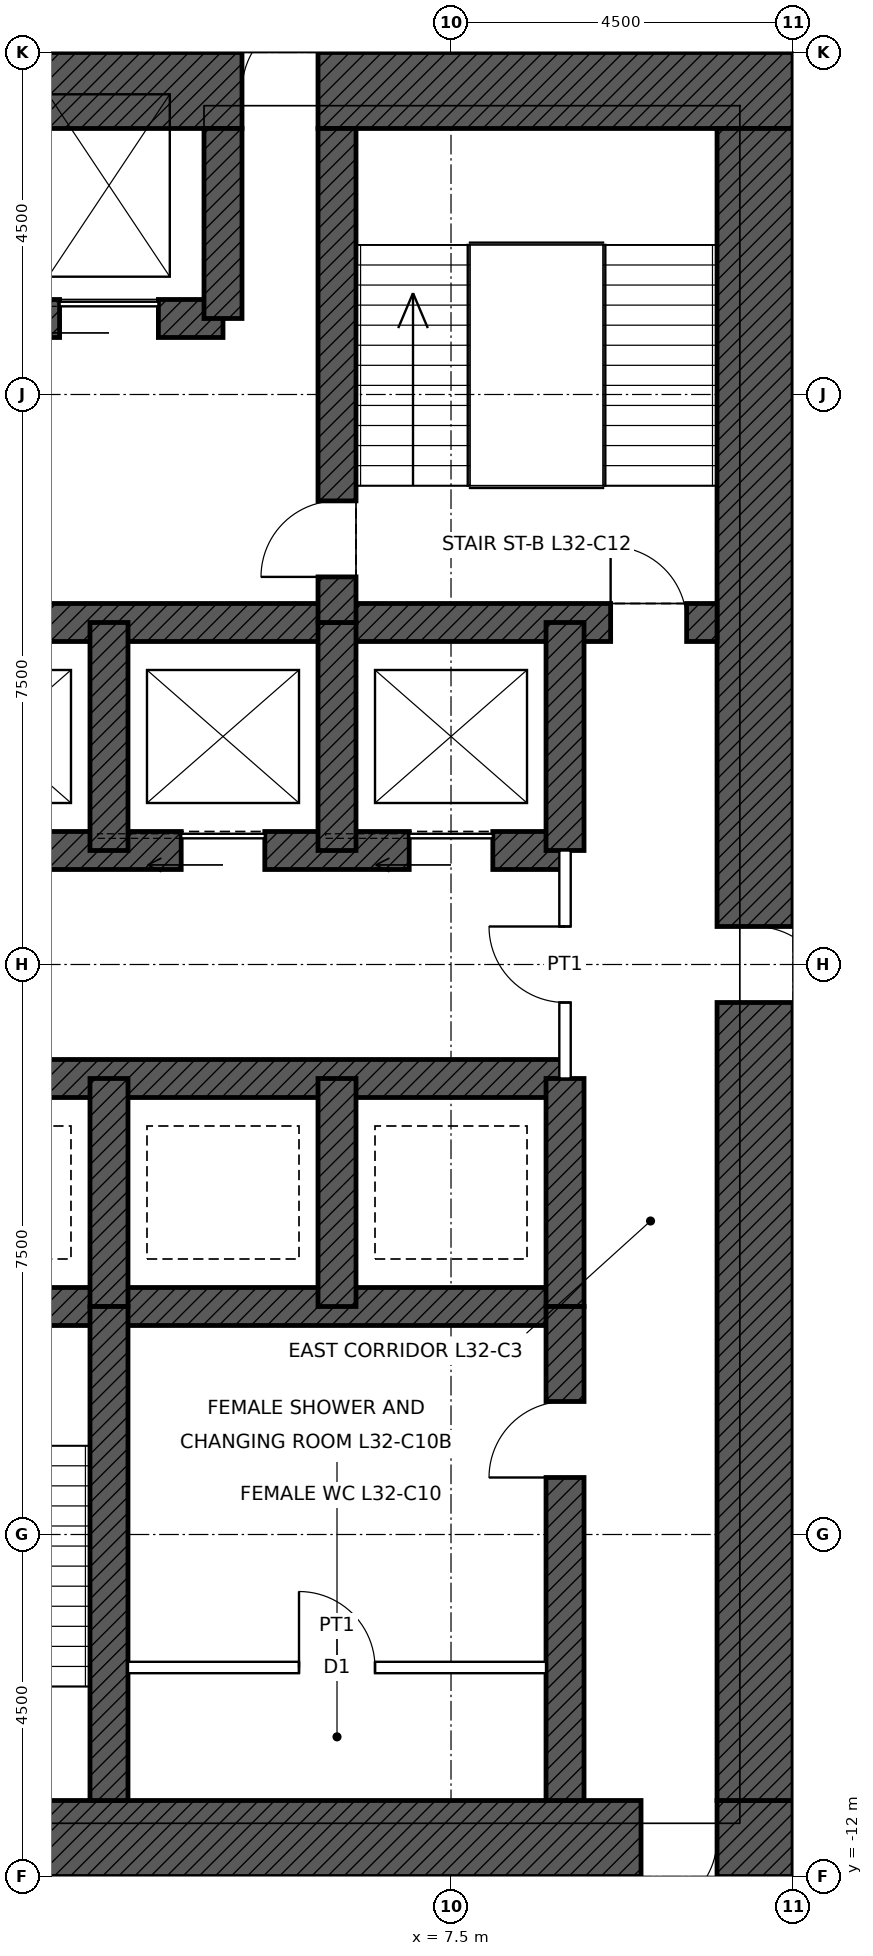
"""IFC4 building model, lengths in metres.
Left out: names, types, materials, properties, quantities, classifications, styles, units other than length and angle.
Written with IfcOpenShell. Run it as: python <this file> out.ifc"""

import sys

from ifc_helpers import new_model, si_unit, direction, frame, frame_2d, origin, place, context, subcontext, project, spatial, rectangle, extrude, element, fill, save


model = new_model("IFC4")
c1 = context("Model", 3, precision=1e-05, world=origin(), true_north=direction((0.0, 1.0)))
c2 = subcontext(c1, "Body", "Model", "MODEL_VIEW")
j1 = project(units=[si_unit("LENGTHUNIT", "METRE"), si_unit("PLANEANGLEUNIT", "RADIAN")], contexts=[c1])
p1 = place(None, origin())
s1 = spatial("IfcSite", under=j1, at=p1, CompositionType="ELEMENT")
p2 = place(p1, origin())
s2 = spatial("IfcBuilding", under=s1, at=p2, CompositionType="ELEMENT")
p3 = place(p2, frame((0.0, 0.0, 158.4)))
s3 = spatial("IfcBuildingStorey", under=s2, at=p3, CompositionType="ELEMENT", Elevation=158.4)
p4 = place(p3, frame((-12.0, 11.5, 0.0), z_axis=(0.0, 0.0, 1.0), x_axis=(1.0, 0.0, 0.0)))
e1 = element("IfcWall", 1, at=p4, inside=s3, PredefinedType="SHEAR", context=c2, shape_type="SweptSolid", body=[
    extrude(rectangle(XDim=24.0, YDim=1.0, at=frame_2d((12.0, 0.0))), origin(), (0.0, 0.0, 1.0), 4.5),
])
p5 = place(p4, frame((6.25, 0.0, 0.0)))
e2 = element("IfcOpeningElement", 2, at=p5, cuts=e1, PredefinedType="OPENING", context=c2, shape_type="SweptSolid", body=[
    extrude(rectangle(XDim=1.0, YDim=2.4, at=frame_2d((0.5, 1.2))), frame((0.0, 0.51, 0.0), z_axis=(0.0, -1.0, 0.0), x_axis=(1.0, 0.0, 0.0)), (0.0, 0.0, 1.0), 1.02),
])
p6 = place(p4, frame((16.75, 0.0, 0.0)))
e3 = element("IfcOpeningElement", 3, at=p6, cuts=e1, PredefinedType="OPENING", context=c2, shape_type="SweptSolid", body=[
    extrude(rectangle(XDim=1.0, YDim=2.4, at=frame_2d((0.5, 1.2))), frame((0.0, 0.51, 0.0), z_axis=(0.0, -1.0, 0.0), x_axis=(1.0, 0.0, 0.0)), (0.0, 0.0, 1.0), 1.02),
])
p7 = place(p3, frame((12.0, -11.5, 0.0), z_axis=(0.0, 0.0, 1.0), x_axis=(-1.0, 0.0, 0.0)))
e4 = element("IfcWall", 4, at=p7, inside=s3, PredefinedType="SHEAR", context=c2, shape_type="SweptSolid", body=[
    extrude(rectangle(XDim=24.0, YDim=1.0, at=frame_2d((12.0, 0.0))), origin(), (0.0, 0.0, 1.0), 4.5),
])
p8 = place(p7, frame((11.5, 0.0, 0.0)))
e5 = element("IfcOpeningElement", 5, at=p8, cuts=e4, PredefinedType="OPENING", context=c2, shape_type="SweptSolid", body=[
    extrude(rectangle(XDim=1.0, YDim=2.1, at=frame_2d((0.5, 1.05))), frame((0.0, 0.51, 0.0), z_axis=(0.0, -1.0, 0.0), x_axis=(1.0, 0.0, 0.0)), (0.0, 0.0, 1.0), 1.02),
])
p9 = place(p7, frame((1.0, 0.0, 0.0)))
e6 = element("IfcOpeningElement", 6, at=p9, cuts=e4, PredefinedType="OPENING", context=c2, shape_type="SweptSolid", body=[
    extrude(rectangle(XDim=1.0, YDim=2.4, at=frame_2d((0.5, 1.2))), frame((0.0, 0.51, 0.0), z_axis=(0.0, -1.0, 0.0), x_axis=(1.0, 0.0, 0.0)), (0.0, 0.0, 1.0), 1.02),
])
p10 = place(p3, frame((11.5, 11.0, 0.0), z_axis=(0.0, 0.0, 1.0), x_axis=(0.0, -1.0, 0.0)))
e7 = element("IfcWall", 7, at=p10, inside=s3, PredefinedType="SHEAR", context=c2, shape_type="SweptSolid", body=[
    extrude(rectangle(XDim=22.0, YDim=1.0, at=frame_2d((11.0, 0.0))), origin(), (0.0, 0.0, 1.0), 4.5),
])
p11 = place(p10, frame((10.5, 0.0, 0.0)))
e8 = element("IfcOpeningElement", 8, at=p11, cuts=e7, PredefinedType="OPENING", context=c2, shape_type="SweptSolid", body=[
    extrude(rectangle(XDim=1.0, YDim=2.4, at=frame_2d((0.5, 1.2))), frame((0.0, 0.51, 0.0), z_axis=(0.0, -1.0, 0.0), x_axis=(1.0, 0.0, 0.0)), (0.0, 0.0, 1.0), 1.02),
])
p12 = place(p3, frame((-11.0, 4.5, 0.0), z_axis=(0.0, 0.0, 1.0), x_axis=(1.0, 0.0, 0.0)))
e9 = element("IfcWall", 9, at=p12, inside=s3, PredefinedType="SHEAR", context=c2, shape_type="SweptSolid", body=[
    extrude(rectangle(XDim=22.0, YDim=0.5, at=frame_2d((11.0, 0.0))), origin(), (0.0, 0.0, 1.0), 4.5),
])
p13 = place(p12, frame((0.4, 0.0, 0.0)))
e10 = element("IfcOpeningElement", 10, at=p13, cuts=e9, PredefinedType="OPENING", context=c2, shape_type="SweptSolid", body=[
    extrude(rectangle(XDim=1.0, YDim=2.1, at=frame_2d((0.5, 1.05))), frame((0.0, 0.26, 0.0), z_axis=(0.0, -1.0, 0.0), x_axis=(1.0, 0.0, 0.0)), (0.0, 0.0, 1.0), 0.52),
])
p14 = place(p12, frame((20.6, 0.0, 0.0)))
e11 = element("IfcOpeningElement", 11, at=p14, cuts=e9, PredefinedType="OPENING", context=c2, shape_type="SweptSolid", body=[
    extrude(rectangle(XDim=1.0, YDim=2.1, at=frame_2d((0.5, 1.05))), frame((0.0, 0.26, 0.0), z_axis=(0.0, -1.0, 0.0), x_axis=(1.0, 0.0, 0.0)), (0.0, 0.0, 1.0), 0.52),
])
p15 = place(p3, frame((-9.0, 1.5, 0.0), z_axis=(0.0, 0.0, 1.0), x_axis=(1.0, 0.0, 0.0)))
e12 = element("IfcWall", 12, at=p15, inside=s3, PredefinedType="SHEAR", context=c2, shape_type="SweptSolid", body=[
    extrude(rectangle(XDim=18.0, YDim=0.5, at=frame_2d((9.0, 0.0))), origin(), (0.0, 0.0, 1.0), 4.5),
])
p16 = place(p15, frame((9.95, 0.0, 0.0)))
e13 = element("IfcOpeningElement", 13, at=p16, cuts=e12, PredefinedType="OPENING", context=c2, shape_type="SweptSolid", body=[
    extrude(rectangle(XDim=1.1, YDim=2.1, at=frame_2d((0.55, 1.05))), frame((0.0, 0.26, 0.0), z_axis=(0.0, -1.0, 0.0), x_axis=(1.0, 0.0, 0.0)), (0.0, 0.0, 1.0), 0.52),
])
p17 = place(p15, frame((12.95, 0.0, 0.0)))
e14 = element("IfcOpeningElement", 14, at=p17, cuts=e12, PredefinedType="OPENING", context=c2, shape_type="SweptSolid", body=[
    extrude(rectangle(XDim=1.1, YDim=2.1, at=frame_2d((0.55, 1.05))), frame((0.0, 0.26, 0.0), z_axis=(0.0, -1.0, 0.0), x_axis=(1.0, 0.0, 0.0)), (0.0, 0.0, 1.0), 0.52),
])
p18 = place(p15, frame((15.95, 0.0, 0.0)))
e15 = element("IfcOpeningElement", 15, at=p18, cuts=e12, PredefinedType="OPENING", context=c2, shape_type="SweptSolid", body=[
    extrude(rectangle(XDim=1.1, YDim=2.1, at=frame_2d((0.55, 1.05))), frame((0.0, 0.26, 0.0), z_axis=(0.0, -1.0, 0.0), x_axis=(1.0, 0.0, 0.0)), (0.0, 0.0, 1.0), 0.52),
])
p19 = place(p15, frame((0.95, 0.0, 0.0)))
e16 = element("IfcOpeningElement", 16, at=p19, cuts=e12, PredefinedType="OPENING", context=c2, shape_type="SweptSolid", body=[
    extrude(rectangle(XDim=1.1, YDim=2.1, at=frame_2d((0.55, 1.05))), frame((0.0, 0.26, 0.0), z_axis=(0.0, -1.0, 0.0), x_axis=(1.0, 0.0, 0.0)), (0.0, 0.0, 1.0), 0.52),
])
p20 = place(p15, frame((3.95, 0.0, 0.0)))
e17 = element("IfcOpeningElement", 17, at=p20, cuts=e12, PredefinedType="OPENING", context=c2, shape_type="SweptSolid", body=[
    extrude(rectangle(XDim=1.1, YDim=2.1, at=frame_2d((0.55, 1.05))), frame((0.0, 0.26, 0.0), z_axis=(0.0, -1.0, 0.0), x_axis=(1.0, 0.0, 0.0)), (0.0, 0.0, 1.0), 0.52),
])
p21 = place(p15, frame((6.95, 0.0, 0.0)))
e18 = element("IfcOpeningElement", 18, at=p21, cuts=e12, PredefinedType="OPENING", context=c2, shape_type="SweptSolid", body=[
    extrude(rectangle(XDim=1.1, YDim=2.1, at=frame_2d((0.55, 1.05))), frame((0.0, 0.26, 0.0), z_axis=(0.0, -1.0, 0.0), x_axis=(1.0, 0.0, 0.0)), (0.0, 0.0, 1.0), 0.52),
])
for number, where, z_axis, x_axis in (
    (19, (-9.0, -1.5, 0.0), (0.0, 0.0, 1.0), (1.0, 0.0, 0.0)),
    (20, (-9.0, -4.5, 0.0), (0.0, 0.0, 1.0), (1.0, 0.0, 0.0)),
):
    element("IfcWall", number, at=place(p3, frame(where, z_axis=z_axis, x_axis=x_axis)), inside=s3, PredefinedType="SHEAR", context=c2, shape_type="SweptSolid", body=[
        extrude(rectangle(XDim=18.0, YDim=0.5, at=frame_2d((9.0, 0.0))), origin(), (0.0, 0.0, 1.0), 4.5),
    ])
p22 = place(p3, frame((-4.5, 8.5, 0.0), z_axis=(0.0, 0.0, 1.0), x_axis=(1.0, 0.0, 0.0)))
e21 = element("IfcWall", 21, at=p22, inside=s3, PredefinedType="SHEAR", context=c2, shape_type="SweptSolid", body=[
    extrude(rectangle(XDim=9.0, YDim=0.5, at=frame_2d((4.5, 0.0))), origin(), (0.0, 0.0, 1.0), 4.5),
])
p23 = place(p22, frame((0.85, 0.0, 0.0)))
e22 = element("IfcOpeningElement", 22, at=p23, cuts=e21, PredefinedType="OPENING", context=c2, shape_type="SweptSolid", body=[
    extrude(rectangle(XDim=1.3, YDim=2.4, at=frame_2d((0.65, 1.2))), frame((0.0, 0.26, 0.0), z_axis=(0.0, -1.0, 0.0), x_axis=(1.0, 0.0, 0.0)), (0.0, 0.0, 1.0), 0.52),
])
p24 = place(p22, frame((6.85, 0.0, 0.0)))
e23 = element("IfcOpeningElement", 23, at=p24, cuts=e21, PredefinedType="OPENING", context=c2, shape_type="SweptSolid", body=[
    extrude(rectangle(XDim=1.3, YDim=2.4, at=frame_2d((0.65, 1.2))), frame((0.0, 0.26, 0.0), z_axis=(0.0, -1.0, 0.0), x_axis=(1.0, 0.0, 0.0)), (0.0, 0.0, 1.0), 0.52),
])
p25 = place(p22, frame((3.85, 0.0, 0.0)))
e24 = element("IfcOpeningElement", 24, at=p25, cuts=e21, PredefinedType="OPENING", context=c2, shape_type="SweptSolid", body=[
    extrude(rectangle(XDim=1.3, YDim=2.4, at=frame_2d((0.65, 1.2))), frame((0.0, 0.26, 0.0), z_axis=(0.0, -1.0, 0.0), x_axis=(1.0, 0.0, 0.0)), (0.0, 0.0, 1.0), 0.52),
])
for number, where, z_axis, x_axis in (
    (25, (9.0, 1.5, 0.0), (0.0, 0.0, 1.0), (0.0, 1.0, 0.0)),
    (26, (9.0, -4.5, 0.0), (0.0, 0.0, 1.0), (0.0, 1.0, 0.0)),
    (27, (3.0, 1.5, 0.0), (0.0, 0.0, 1.0), (0.0, 1.0, 0.0)),
    (28, (6.0, 1.5, 0.0), (0.0, 0.0, 1.0), (0.0, 1.0, 0.0)),
    (29, (3.0, -4.5, 0.0), (0.0, 0.0, 1.0), (0.0, 1.0, 0.0)),
    (30, (6.0, -4.5, 0.0), (0.0, 0.0, 1.0), (0.0, 1.0, 0.0)),
):
    element("IfcWall", number, at=place(p3, frame(where, z_axis=z_axis, x_axis=x_axis)), inside=s3, PredefinedType="SHEAR", context=c2, shape_type="SweptSolid", body=[
        extrude(rectangle(XDim=3.0, YDim=0.5, at=frame_2d((1.5, 0.0))), origin(), (0.0, 0.0, 1.0), 4.5),
    ])
p26 = place(p3, frame((6.0, 4.5, 0.0), z_axis=(0.0, 0.0, 1.0), x_axis=(0.0, 1.0, 0.0)))
e31 = element("IfcWall", 31, at=p26, inside=s3, PredefinedType="SHEAR", context=c2, shape_type="SweptSolid", body=[
    extrude(rectangle(XDim=6.5, YDim=0.5, at=frame_2d((3.25, 0.0))), origin(), (0.0, 0.0, 1.0), 4.5),
])
p27 = place(p26, frame((0.6, 0.0, 0.0)))
e32 = element("IfcOpeningElement", 32, at=p27, cuts=e31, PredefinedType="OPENING", context=c2, shape_type="SweptSolid", body=[
    extrude(rectangle(XDim=1.0, YDim=2.1, at=frame_2d((0.5, 1.05))), frame((0.0, 0.26, 0.0), z_axis=(0.0, -1.0, 0.0), x_axis=(1.0, 0.0, 0.0)), (0.0, 0.0, 1.0), 0.52),
])
p28 = place(p3, frame((4.5, 8.5, 0.0), z_axis=(0.0, 0.0, 1.0), x_axis=(0.0, 1.0, 0.0)))
e33 = element("IfcWall", 33, at=p28, inside=s3, PredefinedType="SHEAR", context=c2, shape_type="SweptSolid", body=[
    extrude(rectangle(XDim=2.5, YDim=0.5, at=frame_2d((1.25, 0.0))), origin(), (0.0, 0.0, 1.0), 4.5),
])
p29 = place(p3, frame((9.0, -11.0, 0.0), z_axis=(0.0, 0.0, 1.0), x_axis=(0.0, 1.0, 0.0)))
e34 = element("IfcWall", 34, at=p29, inside=s3, PredefinedType="SHEAR", context=c2, shape_type="SweptSolid", body=[
    extrude(rectangle(XDim=6.5, YDim=0.5, at=frame_2d((3.25, 0.0))), origin(), (0.0, 0.0, 1.0), 4.5),
])
p30 = place(p29, frame((4.25, 0.0, 0.0)))
e35 = element("IfcOpeningElement", 35, at=p30, cuts=e34, PredefinedType="OPENING", context=c2, shape_type="SweptSolid", body=[
    extrude(rectangle(XDim=1.0, YDim=2.1, at=frame_2d((0.5, 1.05))), frame((0.0, 0.26, 0.0), z_axis=(0.0, -1.0, 0.0), x_axis=(1.0, 0.0, 0.0)), (0.0, 0.0, 1.0), 0.52),
])
p31 = place(p3, frame((3.0, -11.0, 0.0), z_axis=(0.0, 0.0, 1.0), x_axis=(0.0, 1.0, 0.0)))
e36 = element("IfcWall", 36, at=p31, inside=s3, PredefinedType="SHEAR", context=c2, shape_type="SweptSolid", body=[
    extrude(rectangle(XDim=6.5, YDim=0.5, at=frame_2d((3.25, 0.0))), origin(), (0.0, 0.0, 1.0), 4.5),
])
p32 = place(p3, frame((3.25, -9.25, 0.0), z_axis=(0.0, 0.0, 1.0), x_axis=(1.0, 0.0, 0.0)))
e37 = element("IfcWall", 37, at=p32, inside=s3, PredefinedType="PARTITIONING", context=c2, shape_type="SweptSolid", body=[
    extrude(rectangle(XDim=5.5, YDim=0.15, at=frame_2d((2.75, 0.0))), origin(), (0.0, 0.0, 1.0), 4.25),
])
p33 = place(p32, frame((2.25, 0.0, 0.0)))
e38 = element("IfcOpeningElement", 38, at=p33, cuts=e37, PredefinedType="OPENING", context=c2, shape_type="SweptSolid", body=[
    extrude(rectangle(XDim=1.0, YDim=2.1, at=frame_2d((0.5, 1.05))), frame((0.0, 0.085, 0.0), z_axis=(0.0, -1.0, 0.0), x_axis=(1.0, 0.0, 0.0)), (0.0, 0.0, 1.0), 0.17),
])
p34 = place(p3, frame((9.0, -1.5, 0.0), z_axis=(0.0, 0.0, 1.0), x_axis=(0.0, 1.0, 0.0)))
e39 = element("IfcWall", 39, at=p34, inside=s3, PredefinedType="PARTITIONING", context=c2, shape_type="SweptSolid", body=[
    extrude(rectangle(XDim=3.0, YDim=0.15, at=frame_2d((1.5, 0.0))), origin(), (0.0, 0.0, 1.0), 4.25),
])
p35 = place(p34, frame((1.0, 0.0, 0.0)))
e40 = element("IfcOpeningElement", 40, at=p35, cuts=e39, PredefinedType="OPENING", context=c2, shape_type="SweptSolid", body=[
    extrude(rectangle(XDim=1.0, YDim=2.4, at=frame_2d((0.5, 1.2))), frame((0.0, 0.085, 0.0), z_axis=(0.0, -1.0, 0.0), x_axis=(1.0, 0.0, 0.0)), (0.0, 0.0, 1.0), 0.17),
])
p36 = place(p14, origin())
e41 = element("IfcDoor", 41, at=p36, inside=s3, OperationType="SINGLE_SWING_LEFT", PredefinedType="DOOR", context=c2, shape_type="SweptSolid", body=[
    extrude(rectangle(XDim=1.0, YDim=2.1, at=frame_2d((0.5, 1.05))), frame((0.0, 0.025, 0.0), z_axis=(0.0, -1.0, 0.0), x_axis=(1.0, 0.0, 0.0)), (0.0, 0.0, 1.0), 0.05),
])
fill(e11, e41)
p37 = place(p27, origin())
e42 = element("IfcDoor", 42, at=p37, inside=s3, OperationType="SINGLE_SWING_LEFT", PredefinedType="DOOR", context=c2, shape_type="SweptSolid", body=[
    extrude(rectangle(XDim=1.0, YDim=2.1, at=frame_2d((0.5, 1.05))), frame((0.0, 0.025, 0.0), z_axis=(0.0, -1.0, 0.0), x_axis=(1.0, 0.0, 0.0)), (0.0, 0.0, 1.0), 0.05),
])
fill(e32, e42)
p38 = place(p6, origin())
e43 = element("IfcDoor", 43, at=p38, inside=s3, OperationType="SINGLE_SWING_RIGHT", PredefinedType="DOOR", context=c2, shape_type="SweptSolid", body=[
    extrude(rectangle(XDim=1.0, YDim=2.4, at=frame_2d((0.5, 1.2))), frame((0.0, 0.485, 0.0), z_axis=(0.0, -1.0, 0.0), x_axis=(1.0, 0.0, 0.0)), (0.0, 0.0, 1.0), 0.05),
])
fill(e3, e43)
p39 = place(p11, origin())
e44 = element("IfcDoor", 44, at=p39, inside=s3, OperationType="SINGLE_SWING_RIGHT", PredefinedType="DOOR", context=c2, shape_type="SweptSolid", body=[
    extrude(rectangle(XDim=1.0, YDim=2.4, at=frame_2d((0.5, 1.2))), frame((0.0, 0.485, 0.0), z_axis=(0.0, -1.0, 0.0), x_axis=(1.0, 0.0, 0.0)), (0.0, 0.0, 1.0), 0.05),
])
fill(e8, e44)
p40 = place(p9, origin())
e45 = element("IfcDoor", 45, at=p40, inside=s3, OperationType="SINGLE_SWING_RIGHT", PredefinedType="DOOR", context=c2, shape_type="SweptSolid", body=[
    extrude(rectangle(XDim=1.0, YDim=2.4, at=frame_2d((0.5, 1.2))), frame((0.0, 0.485, 0.0), z_axis=(0.0, -1.0, 0.0), x_axis=(1.0, 0.0, 0.0)), (0.0, 0.0, 1.0), 0.05),
])
fill(e6, e45)
p41 = place(p30, origin())
e46 = element("IfcDoor", 46, at=p41, inside=s3, OperationType="SINGLE_SWING_LEFT", PredefinedType="DOOR", context=c2, shape_type="SweptSolid", body=[
    extrude(rectangle(XDim=1.0, YDim=2.1, at=frame_2d((0.5, 1.05))), frame((0.0, 0.025, 0.0), z_axis=(0.0, -1.0, 0.0), x_axis=(1.0, 0.0, 0.0)), (0.0, 0.0, 1.0), 0.05),
])
fill(e35, e46)
p42 = place(p24, origin())
e47 = element("IfcDoor", 47, at=p42, inside=s3, OperationType="SLIDING_TO_LEFT", PredefinedType="DOOR", context=c2, shape_type="SweptSolid", body=[
    extrude(rectangle(XDim=1.3, YDim=2.4, at=frame_2d((0.65, 1.2))), frame((0.0, 0.025, 0.0), z_axis=(0.0, -1.0, 0.0), x_axis=(1.0, 0.0, 0.0)), (0.0, 0.0, 1.0), 0.05),
])
fill(e23, e47)
p43 = place(p17, origin())
e48 = element("IfcDoor", 48, at=p43, inside=s3, OperationType="SLIDING_TO_LEFT", PredefinedType="DOOR", context=c2, shape_type="SweptSolid", body=[
    extrude(rectangle(XDim=1.1, YDim=2.1, at=frame_2d((0.55, 1.05))), frame((0.0, 0.025, 0.0), z_axis=(0.0, -1.0, 0.0), x_axis=(1.0, 0.0, 0.0)), (0.0, 0.0, 1.0), 0.05),
])
fill(e14, e48)
p44 = place(p18, origin())
e49 = element("IfcDoor", 49, at=p44, inside=s3, OperationType="SLIDING_TO_LEFT", PredefinedType="DOOR", context=c2, shape_type="SweptSolid", body=[
    extrude(rectangle(XDim=1.1, YDim=2.1, at=frame_2d((0.55, 1.05))), frame((0.0, 0.025, 0.0), z_axis=(0.0, -1.0, 0.0), x_axis=(1.0, 0.0, 0.0)), (0.0, 0.0, 1.0), 0.05),
])
fill(e15, e49)
p45 = place(p33, origin())
e50 = element("IfcDoor", 50, at=p45, inside=s3, OperationType="SINGLE_SWING_LEFT", PredefinedType="DOOR", context=c2, shape_type="SweptSolid", body=[
    extrude(rectangle(XDim=1.0, YDim=2.1, at=frame_2d((0.5, 1.05))), frame((0.0, 0.025, 0.0), z_axis=(0.0, -1.0, 0.0), x_axis=(1.0, 0.0, 0.0)), (0.0, 0.0, 1.0), 0.05),
])
fill(e38, e50)
p46 = place(p35, origin())
e51 = element("IfcDoor", 51, at=p46, inside=s3, OperationType="SINGLE_SWING_RIGHT", PredefinedType="DOOR", context=c2, shape_type="SweptSolid", body=[
    extrude(rectangle(XDim=1.0, YDim=2.4, at=frame_2d((0.5, 1.2))), frame((0.0, 0.025, 0.0), z_axis=(0.0, -1.0, 0.0), x_axis=(1.0, 0.0, 0.0)), (0.0, 0.0, 1.0), 0.05),
])
fill(e40, e51)
save(model, sys.argv[1])
